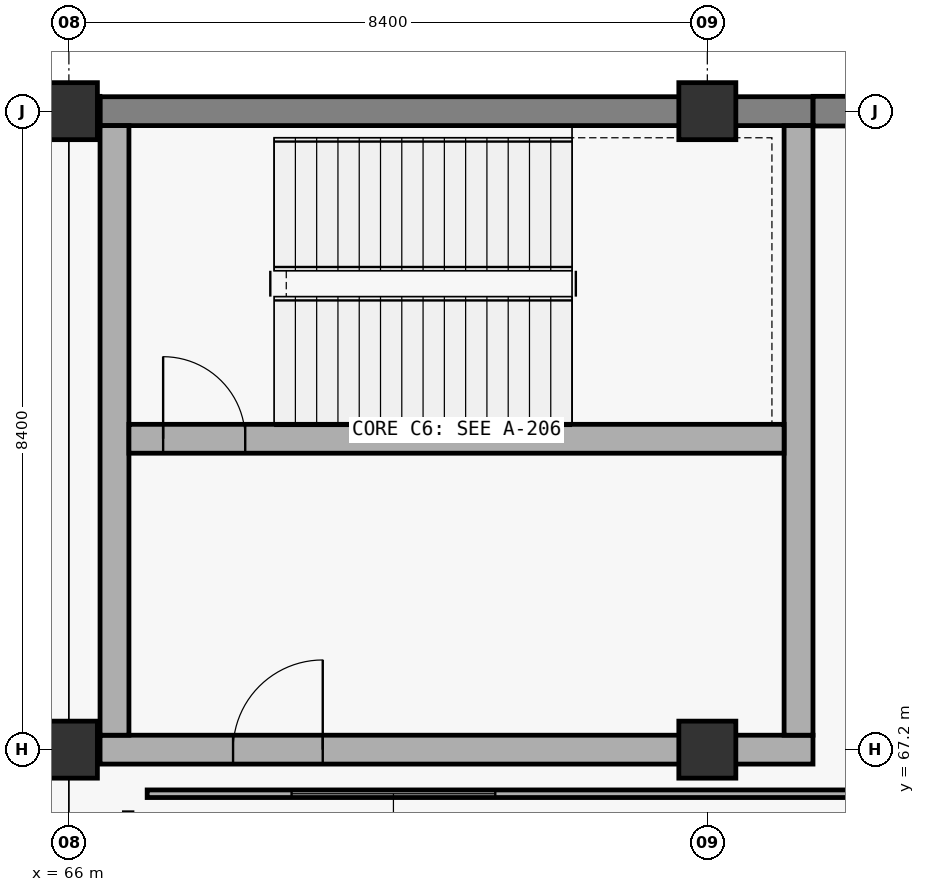
"""IFC4 building model, lengths in metres.
Left out: names, types, materials, properties, quantities, classifications, styles, units other than length and angle.
Written with IfcOpenShell. Run it as: python <this file> out.ifc"""

import sys

from ifc_helpers import new_model, si_unit, direction, frame, frame_2d, origin, origin_2d, place, context, subcontext, project, spatial, rectangle, extrude, element, fill, save


model = new_model("IFC4")
c1 = context("Model", 3, precision=1e-05, world=origin(), true_north=direction((0.0, 1.0)))
c2 = subcontext(c1, "Body", "Model", "MODEL_VIEW")
j1 = project(units=[si_unit("LENGTHUNIT", "METRE"), si_unit("PLANEANGLEUNIT", "RADIAN")], contexts=[c1])
p1 = place(None, origin())
s1 = spatial("IfcSite", under=j1, at=p1, CompositionType="ELEMENT")
p2 = place(p1, origin())
s2 = spatial("IfcBuilding", under=s1, at=p2, CompositionType="ELEMENT")
p3 = place(p2, frame((0.0, 0.0, 5.4)))
s3 = spatial("IfcBuildingStorey", under=s2, at=p3, CompositionType="ELEMENT", Elevation=5.4)
for number, where, z_axis, x_axis in (
    (1, (66.0, 67.2, 0.0), (0.0, 0.0, 1.0), (1.0, 0.0, 0.0)),
    (2, (66.0, 75.6, 0.0), (0.0, 0.0, 1.0), (1.0, 0.0, 0.0)),
    (3, (74.4, 67.2, 0.0), (0.0, 0.0, 1.0), (1.0, 0.0, 0.0)),
    (4, (74.4, 75.6, 0.0), (0.0, 0.0, 1.0), (1.0, 0.0, 0.0)),
):
    element("IfcColumn", number, at=place(p3, frame(where, z_axis=z_axis, x_axis=x_axis)), inside=s3, PredefinedType="COLUMN", context=c2, shape_type="SweptSolid", body=[
        extrude(rectangle(XDim=0.75, YDim=0.75, at=origin_2d()), origin(), (0.0, 0.0, 1.0), 5.1),
    ])
p4 = place(p3, frame((66.41, 67.2, 0.0), z_axis=(0.0, 0.0, 1.0), x_axis=(1.0, 0.0, 0.0)))
e5 = element("IfcWall", 5, at=p4, inside=s3, PredefinedType="SHEAR", context=c2, shape_type="SweptSolid", body=[
    extrude(rectangle(XDim=9.38, YDim=0.38, at=frame_2d((4.69, 0.0))), origin(), (0.0, 0.0, 1.0), 5.1),
])
p5 = place(p4, frame((1.75, 0.0, 0.0)))
e6 = element("IfcOpeningElement", 6, at=p5, cuts=e5, PredefinedType="OPENING", context=c2, shape_type="SweptSolid", body=[
    extrude(rectangle(XDim=1.18, YDim=2.24, at=frame_2d((0.59, 1.12))), frame((0.0, 0.2, 0.0), z_axis=(0.0, -1.0, 0.0), x_axis=(1.0, 0.0, 0.0)), (0.0, 0.0, 1.0), 0.4),
])
p6 = place(p3, frame((66.41, 75.6, 0.0), z_axis=(0.0, 0.0, 1.0), x_axis=(1.0, 0.0, 0.0)))
e7 = element("IfcWall", 7, at=p6, inside=s3, PredefinedType="SHEAR", context=c2, shape_type="SweptSolid", body=[
    extrude(rectangle(XDim=9.38, YDim=0.38, at=frame_2d((4.69, 0.0))), origin(), (0.0, 0.0, 1.0), 5.1),
])
for number, where, z_axis, x_axis in (
    (8, (66.6, 67.39, 0.0), (0.0, 0.0, 1.0), (0.0, 1.0, 0.0)),
    (9, (75.6, 67.39, 0.0), (0.0, 0.0, 1.0), (0.0, 1.0, 0.0)),
):
    element("IfcWall", number, at=place(p3, frame(where, z_axis=z_axis, x_axis=x_axis)), inside=s3, PredefinedType="SHEAR", context=c2, shape_type="SweptSolid", body=[
        extrude(rectangle(XDim=8.02, YDim=0.38, at=frame_2d((4.01, 0.0))), origin(), (0.0, 0.0, 1.0), 5.1),
    ])
p7 = place(p3, frame((66.79, 71.29, 0.0), z_axis=(0.0, 0.0, 1.0), x_axis=(1.0, 0.0, 0.0)))
e10 = element("IfcWall", 10, at=p7, inside=s3, PredefinedType="SHEAR", context=c2, shape_type="SweptSolid", body=[
    extrude(rectangle(XDim=8.62, YDim=0.38, at=frame_2d((4.31, 0.0))), origin(), (0.0, 0.0, 1.0), 5.1),
])
p8 = place(p7, frame((0.45, 0.0, 0.0)))
e11 = element("IfcOpeningElement", 11, at=p8, cuts=e10, PredefinedType="OPENING", context=c2, shape_type="SweptSolid", body=[
    extrude(rectangle(XDim=1.08, YDim=2.18, at=frame_2d((0.54, 1.09))), frame((0.0, 0.2, 0.0), z_axis=(0.0, -1.0, 0.0), x_axis=(1.0, 0.0, 0.0)), (0.0, 0.0, 1.0), 0.4),
])
p9 = place(p3, frame((57.977, 75.6, 0.0), z_axis=(0.0, 0.0, 1.0), x_axis=(1.0, 0.0, 0.0)))
e12 = element("IfcWall", 12, at=p9, inside=s3, PredefinedType="SOLIDWALL", context=c2, shape_type="SweptSolid", body=[
    extrude(rectangle(XDim=8.431, YDim=0.39, at=frame_2d((4.215, 0.0))), origin(), (0.0, 0.0, 1.0), 4.07),
])
p10 = place(p9, frame((1.243, 0.0, 0.85)))
e13 = element("IfcOpeningElement", 13, at=p10, cuts=e12, PredefinedType="OPENING", context=c2, shape_type="SweptSolid", body=[
    extrude(rectangle(XDim=1.4, YDim=2.2, at=frame_2d((0.7, 1.1))), frame((0.0, 0.205, 0.0), z_axis=(0.0, -1.0, 0.0), x_axis=(1.0, 0.0, 0.0)), (0.0, 0.0, 1.0), 0.41),
])
p11 = place(p9, frame((4.543, 0.0, 0.85)))
e14 = element("IfcOpeningElement", 14, at=p11, cuts=e12, PredefinedType="OPENING", context=c2, shape_type="SweptSolid", body=[
    extrude(rectangle(XDim=1.25, YDim=2.05, at=frame_2d((0.625, 1.025))), frame((0.0, 0.205, 0.0), z_axis=(0.0, -1.0, 0.0), x_axis=(1.0, 0.0, 0.0)), (0.0, 0.0, 1.0), 0.41),
])
p12 = place(p3, frame((75.792, 75.6, 0.0), z_axis=(0.0, 0.0, 1.0), x_axis=(1.0, 0.0, 0.0)))
e15 = element("IfcWall", 15, at=p12, inside=s3, PredefinedType="SOLIDWALL", context=c2, shape_type="SweptSolid", body=[
    extrude(rectangle(XDim=6.631, YDim=0.39, at=frame_2d((3.315, 0.0))), origin(), (0.0, 0.0, 1.0), 4.07),
])
p13 = place(p12, frame((1.428, 0.0, 0.85)))
e16 = element("IfcOpeningElement", 16, at=p13, cuts=e15, PredefinedType="OPENING", context=c2, shape_type="SweptSolid", body=[
    extrude(rectangle(XDim=1.4, YDim=2.2, at=frame_2d((0.7, 1.1))), frame((0.0, 0.205, 0.0), z_axis=(0.0, -1.0, 0.0), x_axis=(1.0, 0.0, 0.0)), (0.0, 0.0, 1.0), 0.41),
])
p14 = place(p12, frame((4.728, 0.0, 0.85)))
e17 = element("IfcOpeningElement", 17, at=p14, cuts=e15, PredefinedType="OPENING", context=c2, shape_type="SweptSolid", body=[
    extrude(rectangle(XDim=1.25, YDim=2.05, at=frame_2d((0.625, 1.025))), frame((0.0, 0.205, 0.0), z_axis=(0.0, -1.0, 0.0), x_axis=(1.0, 0.0, 0.0)), (0.0, 0.0, 1.0), 0.41),
])
p15 = place(p3, frame((67.03, 66.62, 0.0), z_axis=(0.0, 0.0, 1.0), x_axis=(1.0, 0.0, 0.0)))
e18 = element("IfcWall", 18, at=p15, inside=s3, PredefinedType="PARTITIONING", context=c2, shape_type="SweptSolid", body=[
    extrude(rectangle(XDim=14.94, YDim=0.1, at=frame_2d((7.47, 0.0))), origin(), (0.0, 0.0, 1.0), 4.17),
])
p16 = place(p15, frame((1.9, 0.0, 0.9)))
e19 = element("IfcOpeningElement", 19, at=p16, cuts=e18, PredefinedType="OPENING", context=c2, shape_type="SweptSolid", body=[
    extrude(rectangle(XDim=2.68, YDim=1.52, at=frame_2d((1.34, 0.76))), frame((0.0, 0.06, 0.0), z_axis=(0.0, -1.0, 0.0), x_axis=(1.0, 0.0, 0.0)), (0.0, 0.0, 1.0), 0.12),
])
p17 = place(p8, origin())
e20 = element("IfcDoor", 20, at=p17, inside=s3, OperationType="SINGLE_SWING_LEFT", PredefinedType="DOOR", context=c2, shape_type="SweptSolid", body=[
    extrude(rectangle(XDim=1.08, YDim=2.18, at=frame_2d((0.54, 1.09))), frame((0.0, 0.025, 0.0), z_axis=(0.0, -1.0, 0.0), x_axis=(1.0, 0.0, 0.0)), (0.0, 0.0, 1.0), 0.05),
])
fill(e11, e20)
p18 = place(p5, origin())
e21 = element("IfcDoor", 21, at=p18, inside=s3, OperationType="SINGLE_SWING_RIGHT", PredefinedType="DOOR", context=c2, shape_type="SweptSolid", body=[
    extrude(rectangle(XDim=1.18, YDim=2.24, at=frame_2d((0.59, 1.12))), frame((0.0, 0.025, 0.0), z_axis=(0.0, -1.0, 0.0), x_axis=(1.0, 0.0, 0.0)), (0.0, 0.0, 1.0), 0.05),
])
fill(e6, e21)
p19 = place(p16, origin())
e22 = element("IfcWindow", 22, at=p19, inside=s3, PartitioningType="SINGLE_PANEL", PredefinedType="WINDOW", context=c2, shape_type="SweptSolid", body=[
    extrude(rectangle(XDim=2.68, YDim=1.52, at=frame_2d((1.34, 0.76))), frame((0.0, 0.03, 0.0), z_axis=(0.0, -1.0, 0.0), x_axis=(1.0, 0.0, 0.0)), (0.0, 0.0, 1.0), 0.06),
])
fill(e19, e22)
save(model, sys.argv[1])
